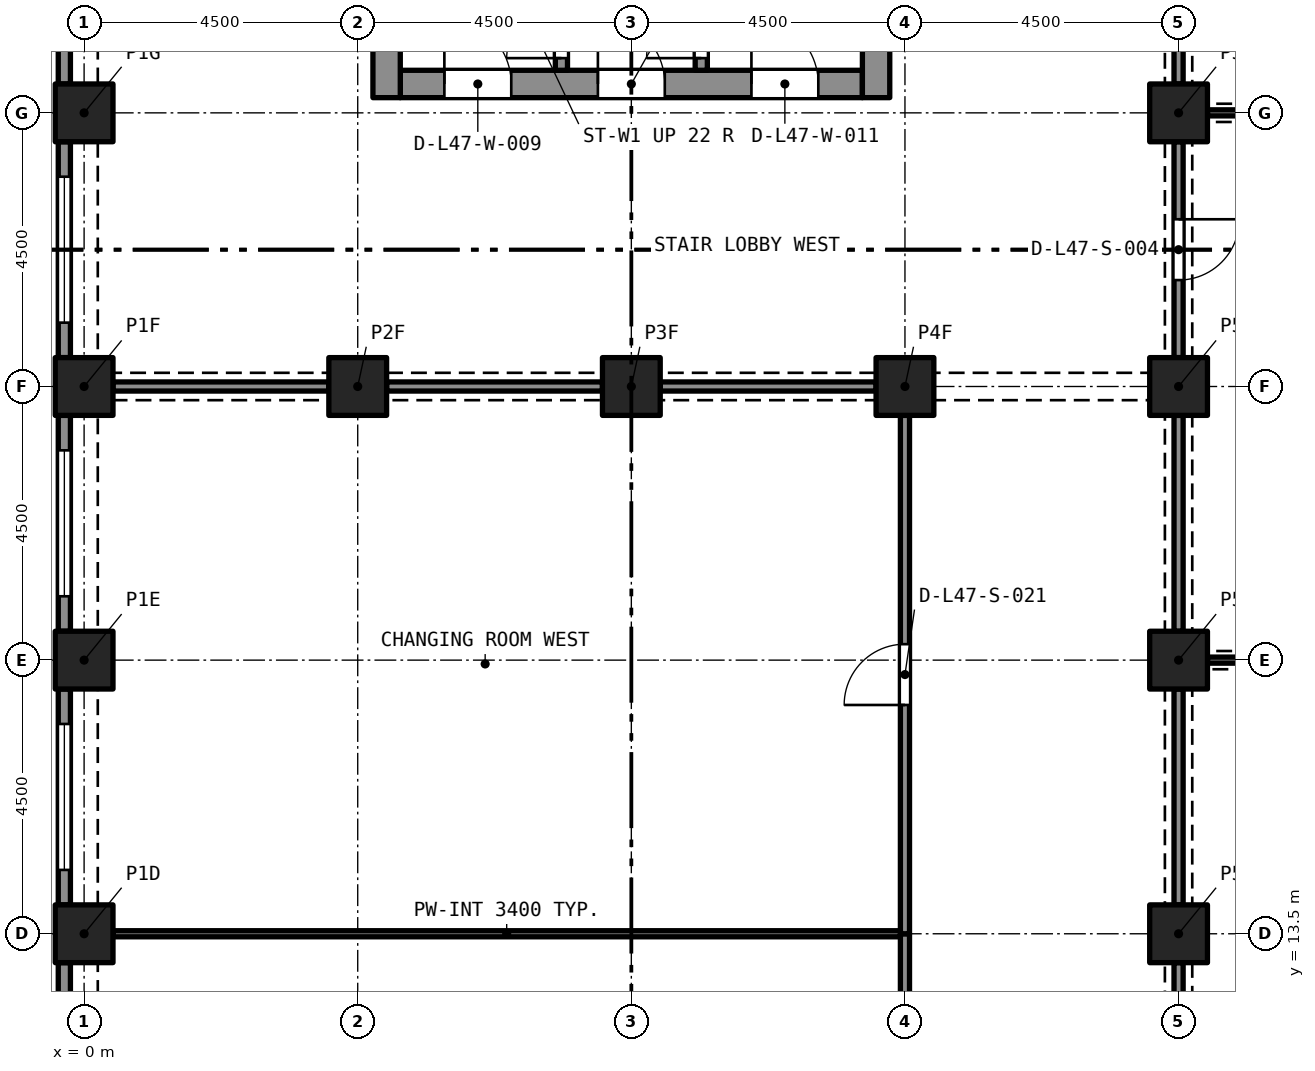
"""IFC4 building model, lengths in metres.
Left out: names, types, materials, properties, quantities, classifications, styles, units other than length and angle.
Written with IfcOpenShell. Run it as: python <this file> out.ifc"""

import sys

from ifc_helpers import new_model, si_unit, direction, frame, frame_2d, origin, origin_2d, place, context, subcontext, project, spatial, rectangle, extrude, element, fill, save


model = new_model("IFC4")
c1 = context("Model", 3, precision=1e-05, world=origin(), true_north=direction((0.0, 1.0)))
c2 = subcontext(c1, "Body", "Model", "MODEL_VIEW")
j1 = project(units=[si_unit("LENGTHUNIT", "METRE"), si_unit("PLANEANGLEUNIT", "RADIAN")], contexts=[c1])
p1 = place(None, origin())
s1 = spatial("IfcSite", under=j1, at=p1, CompositionType="ELEMENT")
p2 = place(p1, origin())
s2 = spatial("IfcBuilding", under=s1, at=p2, CompositionType="ELEMENT")
p3 = place(p2, frame((0.0, 0.0, 172.6)))
s3 = spatial("IfcBuildingStorey", under=s2, at=p3, CompositionType="ELEMENT", Elevation=172.6)
for number, where, z_axis, x_axis in (
    (1, (0.0, 13.5, 0.0), (0.0, 0.0, 1.0), (1.0, 0.0, 0.0)),
    (2, (18.0, 13.5, 0.0), (0.0, 0.0, 1.0), (1.0, 0.0, 0.0)),
    (3, (0.0, 18.0, 0.0), (0.0, 0.0, 1.0), (1.0, 0.0, 0.0)),
    (4, (18.0, 18.0, 0.0), (0.0, 0.0, 1.0), (1.0, 0.0, 0.0)),
    (5, (0.0, 22.5, 0.0), (0.0, 0.0, 1.0), (1.0, 0.0, 0.0)),
    (6, (4.5, 22.5, 0.0), (0.0, 0.0, 1.0), (1.0, 0.0, 0.0)),
    (7, (9.0, 22.5, 0.0), (0.0, 0.0, 1.0), (1.0, 0.0, 0.0)),
    (8, (13.5, 22.5, 0.0), (0.0, 0.0, 1.0), (1.0, 0.0, 0.0)),
    (9, (18.0, 22.5, 0.0), (0.0, 0.0, 1.0), (1.0, 0.0, 0.0)),
    (10, (0.0, 27.0, 0.0), (0.0, 0.0, 1.0), (1.0, 0.0, 0.0)),
    (11, (18.0, 27.0, 0.0), (0.0, 0.0, 1.0), (1.0, 0.0, 0.0)),
):
    element("IfcColumn", number, at=place(p3, frame(where, z_axis=z_axis, x_axis=x_axis)), inside=s3, PredefinedType="COLUMN", context=c2, shape_type="SweptSolid", body=[
        extrude(rectangle(XDim=0.95, YDim=0.95, at=origin_2d()), origin(), (0.0, 0.0, 1.0), 3.7),
    ])
p4 = place(p3, frame((5.2, 27.475, 0.0), z_axis=(0.0, 0.0, 1.0), x_axis=(1.0, 0.0, 0.0)))
e12 = element("IfcWall", 12, at=p4, inside=s3, PredefinedType="SOLIDWALL", context=c2, shape_type="SweptSolid", body=[
    extrude(rectangle(XDim=7.6, YDim=0.45, at=frame_2d((3.8, 0.0))), origin(), (0.0, 0.0, 1.0), 3.7),
])
p5 = place(p4, frame((0.725, 0.0, 0.0)))
e13 = element("IfcOpeningElement", 13, at=p5, cuts=e12, PredefinedType="OPENING", context=c2, shape_type="SweptSolid", body=[
    extrude(rectangle(XDim=1.1, YDim=2.1, at=frame_2d((0.55, 1.05))), frame((0.0, 0.235, 0.0), z_axis=(0.0, -1.0, 0.0), x_axis=(1.0, 0.0, 0.0)), (0.0, 0.0, 1.0), 0.47),
])
p6 = place(p4, frame((3.25, 0.0, 0.0)))
e14 = element("IfcOpeningElement", 14, at=p6, cuts=e12, PredefinedType="OPENING", context=c2, shape_type="SweptSolid", body=[
    extrude(rectangle(XDim=1.1, YDim=2.1, at=frame_2d((0.55, 1.05))), frame((0.0, 0.235, 0.0), z_axis=(0.0, -1.0, 0.0), x_axis=(1.0, 0.0, 0.0)), (0.0, 0.0, 1.0), 0.47),
])
p7 = place(p4, frame((5.775, 0.0, 0.0)))
e15 = element("IfcOpeningElement", 15, at=p7, cuts=e12, PredefinedType="OPENING", context=c2, shape_type="SweptSolid", body=[
    extrude(rectangle(XDim=1.1, YDim=2.1, at=frame_2d((0.55, 1.05))), frame((0.0, 0.235, 0.0), z_axis=(0.0, -1.0, 0.0), x_axis=(1.0, 0.0, 0.0)), (0.0, 0.0, 1.0), 0.47),
])
p8 = place(p3, frame((4.975, 27.25, 0.0), z_axis=(0.0, 0.0, 1.0), x_axis=(0.0, 1.0, 0.0)))
e16 = element("IfcWall", 16, at=p8, inside=s3, PredefinedType="SOLIDWALL", context=c2, shape_type="SweptSolid", body=[
    extrude(rectangle(XDim=13.0, YDim=0.45, at=frame_2d((6.5, 0.0))), origin(), (0.0, 0.0, 1.0), 3.7),
])
p9 = place(p8, frame((8.7, 0.0, 0.0)))
e17 = element("IfcOpeningElement", 17, at=p9, cuts=e16, PredefinedType="OPENING", context=c2, shape_type="SweptSolid", body=[
    extrude(rectangle(XDim=1.2, YDim=2.1, at=frame_2d((0.6, 1.05))), frame((0.0, 0.235, 0.0), z_axis=(0.0, -1.0, 0.0), x_axis=(1.0, 0.0, 0.0)), (0.0, 0.0, 1.0), 0.47),
])
p10 = place(p3, frame((13.025, 27.25, 0.0), z_axis=(0.0, 0.0, 1.0), x_axis=(0.0, 1.0, 0.0)))
e18 = element("IfcWall", 18, at=p10, inside=s3, PredefinedType="SOLIDWALL", context=c2, shape_type="SweptSolid", body=[
    extrude(rectangle(XDim=13.0, YDim=0.45, at=frame_2d((6.5, 0.0))), origin(), (0.0, 0.0, 1.0), 3.7),
])
p11 = place(p10, frame((10.85, 0.0, 0.0)))
e19 = element("IfcOpeningElement", 19, at=p11, cuts=e18, PredefinedType="OPENING", context=c2, shape_type="SweptSolid", body=[
    extrude(rectangle(XDim=1.1, YDim=2.1, at=frame_2d((0.55, 1.05))), frame((0.0, 0.235, 0.0), z_axis=(0.0, -1.0, 0.0), x_axis=(1.0, 0.0, 0.0)), (0.0, 0.0, 1.0), 0.47),
])
p12 = place(p10, frame((8.7, 0.0, 0.0)))
e20 = element("IfcOpeningElement", 20, at=p12, cuts=e18, PredefinedType="OPENING", context=c2, shape_type="SweptSolid", body=[
    extrude(rectangle(XDim=1.2, YDim=2.1, at=frame_2d((0.6, 1.05))), frame((0.0, 0.235, 0.0), z_axis=(0.0, -1.0, 0.0), x_axis=(1.0, 0.0, 0.0)), (0.0, 0.0, 1.0), 0.47),
])
p13 = place(p3, frame((-0.325, 27.475, 0.0), z_axis=(0.0, 0.0, 1.0), x_axis=(0.0, 1.0, 0.0)))
e21 = element("IfcWall", 21, at=p13, inside=s3, PredefinedType="SOLIDWALL", context=c2, shape_type="SweptSolid", body=[
    extrude(rectangle(XDim=3.55, YDim=0.2, at=frame_2d((1.775, 0.0))), origin(), (0.0, 0.0, 1.0), 3.7),
])
p14 = place(p13, frame((0.575, 0.0, 0.45)))
e22 = element("IfcOpeningElement", 22, at=p14, cuts=e21, PredefinedType="OPENING", context=c2, shape_type="SweptSolid", body=[
    extrude(rectangle(XDim=2.4, YDim=1.95, at=frame_2d((1.2, 0.975))), frame((0.0, 0.11, 0.0), z_axis=(0.0, -1.0, 0.0), x_axis=(1.0, 0.0, 0.0)), (0.0, 0.0, 1.0), 0.22),
])
p15 = place(p3, frame((-0.325, 22.975, 0.0), z_axis=(0.0, 0.0, 1.0), x_axis=(0.0, 1.0, 0.0)))
e23 = element("IfcWall", 23, at=p15, inside=s3, PredefinedType="SOLIDWALL", context=c2, shape_type="SweptSolid", body=[
    extrude(rectangle(XDim=3.55, YDim=0.2, at=frame_2d((1.775, 0.0))), origin(), (0.0, 0.0, 1.0), 3.7),
])
p16 = place(p15, frame((0.575, 0.0, 0.45)))
e24 = element("IfcOpeningElement", 24, at=p16, cuts=e23, PredefinedType="OPENING", context=c2, shape_type="SweptSolid", body=[
    extrude(rectangle(XDim=2.4, YDim=1.95, at=frame_2d((1.2, 0.975))), frame((0.0, 0.11, 0.0), z_axis=(0.0, -1.0, 0.0), x_axis=(1.0, 0.0, 0.0)), (0.0, 0.0, 1.0), 0.22),
])
p17 = place(p3, frame((-0.325, 18.475, 0.0), z_axis=(0.0, 0.0, 1.0), x_axis=(0.0, 1.0, 0.0)))
e25 = element("IfcWall", 25, at=p17, inside=s3, PredefinedType="SOLIDWALL", context=c2, shape_type="SweptSolid", body=[
    extrude(rectangle(XDim=3.55, YDim=0.2, at=frame_2d((1.775, 0.0))), origin(), (0.0, 0.0, 1.0), 3.7),
])
p18 = place(p17, frame((0.575, 0.0, 0.45)))
e26 = element("IfcOpeningElement", 26, at=p18, cuts=e25, PredefinedType="OPENING", context=c2, shape_type="SweptSolid", body=[
    extrude(rectangle(XDim=2.4, YDim=1.95, at=frame_2d((1.2, 0.975))), frame((0.0, 0.11, 0.0), z_axis=(0.0, -1.0, 0.0), x_axis=(1.0, 0.0, 0.0)), (0.0, 0.0, 1.0), 0.22),
])
p19 = place(p3, frame((-0.325, 13.975, 0.0), z_axis=(0.0, 0.0, 1.0), x_axis=(0.0, 1.0, 0.0)))
e27 = element("IfcWall", 27, at=p19, inside=s3, PredefinedType="SOLIDWALL", context=c2, shape_type="SweptSolid", body=[
    extrude(rectangle(XDim=3.55, YDim=0.2, at=frame_2d((1.775, 0.0))), origin(), (0.0, 0.0, 1.0), 3.7),
])
p20 = place(p19, frame((0.575, 0.0, 0.45)))
e28 = element("IfcOpeningElement", 28, at=p20, cuts=e27, PredefinedType="OPENING", context=c2, shape_type="SweptSolid", body=[
    extrude(rectangle(XDim=2.4, YDim=1.95, at=frame_2d((1.2, 0.975))), frame((0.0, 0.11, 0.0), z_axis=(0.0, -1.0, 0.0), x_axis=(1.0, 0.0, 0.0)), (0.0, 0.0, 1.0), 0.22),
])
p21 = place(p3, frame((-0.325, 9.475, 0.0), z_axis=(0.0, 0.0, 1.0), x_axis=(0.0, 1.0, 0.0)))
e29 = element("IfcWall", 29, at=p21, inside=s3, PredefinedType="SOLIDWALL", context=c2, shape_type="SweptSolid", body=[
    extrude(rectangle(XDim=3.55, YDim=0.2, at=frame_2d((1.775, 0.0))), origin(), (0.0, 0.0, 1.0), 3.7),
])
p22 = place(p21, frame((0.575, 0.0, 0.45)))
e30 = element("IfcOpeningElement", 30, at=p22, cuts=e29, PredefinedType="OPENING", context=c2, shape_type="SweptSolid", body=[
    extrude(rectangle(XDim=2.4, YDim=1.95, at=frame_2d((1.2, 0.975))), frame((0.0, 0.11, 0.0), z_axis=(0.0, -1.0, 0.0), x_axis=(1.0, 0.0, 0.0)), (0.0, 0.0, 1.0), 0.22),
])
p23 = place(p3, frame((7.85, 27.7, 0.0), z_axis=(0.0, 0.0, 1.0), x_axis=(0.0, 1.0, 0.0)))
e31 = element("IfcWall", 31, at=p23, inside=s3, PredefinedType="SOLIDWALL", context=c2, shape_type="SweptSolid", body=[
    extrude(rectangle(XDim=5.4, YDim=0.2, at=frame_2d((2.7, 0.0))), origin(), (0.0, 0.0, 1.0), 3.4),
])
p24 = place(p23, frame((0.2, 0.0, 0.0)))
e32 = element("IfcOpeningElement", 32, at=p24, cuts=e31, PredefinedType="OPENING", context=c2, shape_type="SweptSolid", body=[
    extrude(rectangle(XDim=0.9, YDim=2.1, at=frame_2d((0.45, 1.05))), frame((0.0, 0.11, 0.0), z_axis=(0.0, -1.0, 0.0), x_axis=(1.0, 0.0, 0.0)), (0.0, 0.0, 1.0), 0.22),
])
p25 = place(p3, frame((10.15, 27.7, 0.0), z_axis=(0.0, 0.0, 1.0), x_axis=(0.0, 1.0, 0.0)))
e33 = element("IfcWall", 33, at=p25, inside=s3, PredefinedType="SOLIDWALL", context=c2, shape_type="SweptSolid", body=[
    extrude(rectangle(XDim=5.4, YDim=0.2, at=frame_2d((2.7, 0.0))), origin(), (0.0, 0.0, 1.0), 3.4),
])
p26 = place(p25, frame((0.2, 0.0, 0.0)))
e34 = element("IfcOpeningElement", 34, at=p26, cuts=e33, PredefinedType="OPENING", context=c2, shape_type="SweptSolid", body=[
    extrude(rectangle(XDim=0.9, YDim=2.1, at=frame_2d((0.45, 1.05))), frame((0.0, 0.11, 0.0), z_axis=(0.0, -1.0, 0.0), x_axis=(1.0, 0.0, 0.0)), (0.0, 0.0, 1.0), 0.22),
])
p27 = place(p3, frame((18.475, 18.0, 0.0), z_axis=(0.0, 0.0, 1.0), x_axis=(1.0, 0.0, 0.0)))
e35 = element("IfcWall", 35, at=p27, inside=s3, PredefinedType="PARTITIONING", context=c2, shape_type="SweptSolid", body=[
    extrude(rectangle(XDim=12.55, YDim=0.1, at=frame_2d((6.275, 0.0))), origin(), (0.0, 0.0, 1.0), 3.25),
])
p28 = place(p3, frame((18.0, 13.025, 0.0), z_axis=(0.0, 0.0, 1.0), x_axis=(0.0, -1.0, 0.0)))
e36 = element("IfcWall", 36, at=p28, inside=s3, PredefinedType="PARTITIONING", context=c2, shape_type="SweptSolid", body=[
    extrude(rectangle(XDim=3.55, YDim=0.15, at=frame_2d((1.775, 0.0))), origin(), (0.0, 0.0, 1.0), 2.88),
])
p29 = place(p28, frame((1.275, 0.0, 0.0)))
e37 = element("IfcOpeningElement", 37, at=p29, cuts=e36, PredefinedType="OPENING", context=c2, shape_type="SweptSolid", body=[
    extrude(rectangle(XDim=1.0, YDim=2.1, at=frame_2d((0.5, 1.05))), frame((0.0, 0.085, 0.0), z_axis=(0.0, -1.0, 0.0), x_axis=(1.0, 0.0, 0.0)), (0.0, 0.0, 1.0), 0.17),
])
p30 = place(p3, frame((18.0, 13.975, 0.0), z_axis=(0.0, 0.0, 1.0), x_axis=(0.0, 1.0, 0.0)))
e38 = element("IfcWall", 38, at=p30, inside=s3, PredefinedType="PARTITIONING", context=c2, shape_type="SweptSolid", body=[
    extrude(rectangle(XDim=3.55, YDim=0.15, at=frame_2d((1.775, 0.0))), origin(), (0.0, 0.0, 1.0), 2.88),
])
p31 = place(p3, frame((18.475, 27.0, 0.0), z_axis=(0.0, 0.0, 1.0), x_axis=(1.0, 0.0, 0.0)))
e39 = element("IfcWall", 39, at=p31, inside=s3, PredefinedType="PARTITIONING", context=c2, shape_type="SweptSolid", body=[
    extrude(rectangle(XDim=12.55, YDim=0.1, at=frame_2d((6.275, 0.0))), origin(), (0.0, 0.0, 1.0), 3.25),
])
p32 = place(p3, frame((18.0, 26.525, 0.0), z_axis=(0.0, 0.0, 1.0), x_axis=(0.0, -1.0, 0.0)))
e40 = element("IfcWall", 40, at=p32, inside=s3, PredefinedType="PARTITIONING", context=c2, shape_type="SweptSolid", body=[
    extrude(rectangle(XDim=3.55, YDim=0.15, at=frame_2d((1.775, 0.0))), origin(), (0.0, 0.0, 1.0), 2.88),
])
p33 = place(p32, frame((1.275, 0.0, 0.0)))
e41 = element("IfcOpeningElement", 41, at=p33, cuts=e40, PredefinedType="OPENING", context=c2, shape_type="SweptSolid", body=[
    extrude(rectangle(XDim=1.0, YDim=2.1, at=frame_2d((0.5, 1.05))), frame((0.0, 0.085, 0.0), z_axis=(0.0, -1.0, 0.0), x_axis=(1.0, 0.0, 0.0)), (0.0, 0.0, 1.0), 0.17),
])
p34 = place(p3, frame((18.0, 18.475, 0.0), z_axis=(0.0, 0.0, 1.0), x_axis=(0.0, 1.0, 0.0)))
e42 = element("IfcWall", 42, at=p34, inside=s3, PredefinedType="PARTITIONING", context=c2, shape_type="SweptSolid", body=[
    extrude(rectangle(XDim=3.55, YDim=0.15, at=frame_2d((1.775, 0.0))), origin(), (0.0, 0.0, 1.0), 2.88),
])
p35 = place(p3, frame((18.0, 31.025, 0.0), z_axis=(0.0, 0.0, 1.0), x_axis=(0.0, -1.0, 0.0)))
e43 = element("IfcWall", 43, at=p35, inside=s3, PredefinedType="PARTITIONING", context=c2, shape_type="SweptSolid", body=[
    extrude(rectangle(XDim=3.55, YDim=0.15, at=frame_2d((1.775, 0.0))), origin(), (0.0, 0.0, 1.0), 2.88),
])
p36 = place(p35, frame((1.175, 0.0, 0.0)))
e44 = element("IfcOpeningElement", 44, at=p36, cuts=e43, PredefinedType="OPENING", context=c2, shape_type="SweptSolid", body=[
    extrude(rectangle(XDim=1.2, YDim=2.1, at=frame_2d((0.6, 1.05))), frame((0.0, 0.085, 0.0), z_axis=(0.0, -1.0, 0.0), x_axis=(1.0, 0.0, 0.0)), (0.0, 0.0, 1.0), 0.17),
])
for number, where, z_axis, x_axis in (
    (45, (9.475, 22.5, 0.0), (0.0, 0.0, 1.0), (1.0, 0.0, 0.0)),
    (46, (4.975, 22.5, 0.0), (0.0, 0.0, 1.0), (1.0, 0.0, 0.0)),
    (47, (0.475, 22.5, 0.0), (0.0, 0.0, 1.0), (1.0, 0.0, 0.0)),
):
    element("IfcWall", number, at=place(p3, frame(where, z_axis=z_axis, x_axis=x_axis)), inside=s3, PredefinedType="PARTITIONING", context=c2, shape_type="SweptSolid", body=[
        extrude(rectangle(XDim=3.55, YDim=0.15, at=frame_2d((1.775, 0.0))), origin(), (0.0, 0.0, 1.0), 2.88),
    ])
p37 = place(p3, frame((13.5, 4.5, 0.0), z_axis=(0.0, 0.0, 1.0), x_axis=(0.0, 1.0, 0.0)))
e48 = element("IfcWall", 48, at=p37, inside=s3, PredefinedType="PARTITIONING", context=c2, shape_type="SweptSolid", body=[
    extrude(rectangle(XDim=9.0, YDim=0.15, at=frame_2d((4.5, 0.0))), origin(), (0.0, 0.0, 1.0), 3.4),
])
p38 = place(p37, frame((4.0, 0.0, 0.0)))
e49 = element("IfcOpeningElement", 49, at=p38, cuts=e48, PredefinedType="OPENING", context=c2, shape_type="SweptSolid", body=[
    extrude(rectangle(XDim=1.0, YDim=2.1, at=frame_2d((0.5, 1.05))), frame((0.0, 0.085, 0.0), z_axis=(0.0, -1.0, 0.0), x_axis=(1.0, 0.0, 0.0)), (0.0, 0.0, 1.0), 0.17),
])
p39 = place(p3, frame((13.5, 13.5, 0.0), z_axis=(0.0, 0.0, 1.0), x_axis=(0.0, 1.0, 0.0)))
e50 = element("IfcWall", 50, at=p39, inside=s3, PredefinedType="PARTITIONING", context=c2, shape_type="SweptSolid", body=[
    extrude(rectangle(XDim=8.525, YDim=0.15, at=frame_2d((4.262, 0.0))), origin(), (0.0, 0.0, 1.0), 3.4),
])
p40 = place(p39, frame((3.762, 0.0, 0.0)))
e51 = element("IfcOpeningElement", 51, at=p40, cuts=e50, PredefinedType="OPENING", context=c2, shape_type="SweptSolid", body=[
    extrude(rectangle(XDim=1.0, YDim=2.1, at=frame_2d((0.5, 1.05))), frame((0.0, 0.085, 0.0), z_axis=(0.0, -1.0, 0.0), x_axis=(1.0, 0.0, 0.0)), (0.0, 0.0, 1.0), 0.17),
])
p41 = place(p3, frame((0.475, 13.5, 0.0), z_axis=(0.0, 0.0, 1.0), x_axis=(1.0, 0.0, 0.0)))
e52 = element("IfcWall", 52, at=p41, inside=s3, PredefinedType="PARTITIONING", context=c2, shape_type="SweptSolid", body=[
    extrude(rectangle(XDim=12.95, YDim=0.1, at=frame_2d((6.475, 0.0))), origin(), (0.0, 0.0, 1.0), 3.4),
])
p42 = place(p16, origin())
e53 = element("IfcWindow", 53, at=p42, inside=s3, PartitioningType="SINGLE_PANEL", PredefinedType="WINDOW", context=c2, shape_type="SweptSolid", body=[
    extrude(rectangle(XDim=2.4, YDim=1.95, at=frame_2d((1.2, 0.975))), frame((0.0, 0.03, 0.0), z_axis=(0.0, -1.0, 0.0), x_axis=(1.0, 0.0, 0.0)), (0.0, 0.0, 1.0), 0.06),
])
fill(e24, e53)
p43 = place(p18, origin())
e54 = element("IfcWindow", 54, at=p43, inside=s3, PartitioningType="SINGLE_PANEL", PredefinedType="WINDOW", context=c2, shape_type="SweptSolid", body=[
    extrude(rectangle(XDim=2.4, YDim=1.95, at=frame_2d((1.2, 0.975))), frame((0.0, 0.03, 0.0), z_axis=(0.0, -1.0, 0.0), x_axis=(1.0, 0.0, 0.0)), (0.0, 0.0, 1.0), 0.06),
])
fill(e26, e54)
p44 = place(p20, origin())
e55 = element("IfcWindow", 55, at=p44, inside=s3, PartitioningType="SINGLE_PANEL", PredefinedType="WINDOW", context=c2, shape_type="SweptSolid", body=[
    extrude(rectangle(XDim=2.4, YDim=1.95, at=frame_2d((1.2, 0.975))), frame((0.0, 0.03, 0.0), z_axis=(0.0, -1.0, 0.0), x_axis=(1.0, 0.0, 0.0)), (0.0, 0.0, 1.0), 0.06),
])
fill(e28, e55)
p45 = place(p24, origin())
e56 = element("IfcDoor", 56, at=p45, inside=s3, OperationType="SINGLE_SWING_LEFT", PredefinedType="DOOR", context=c2, shape_type="SweptSolid", body=[
    extrude(rectangle(XDim=0.9, YDim=2.1, at=frame_2d((0.45, 1.05))), frame((0.0, 0.025, 0.0), z_axis=(0.0, -1.0, 0.0), x_axis=(1.0, 0.0, 0.0)), (0.0, 0.0, 1.0), 0.05),
])
fill(e32, e56)
p46 = place(p26, origin())
e57 = element("IfcDoor", 57, at=p46, inside=s3, OperationType="SINGLE_SWING_LEFT", PredefinedType="DOOR", context=c2, shape_type="SweptSolid", body=[
    extrude(rectangle(XDim=0.9, YDim=2.1, at=frame_2d((0.45, 1.05))), frame((0.0, 0.025, 0.0), z_axis=(0.0, -1.0, 0.0), x_axis=(1.0, 0.0, 0.0)), (0.0, 0.0, 1.0), 0.05),
])
fill(e34, e57)
p47 = place(p5, origin())
e58 = element("IfcDoor", 58, at=p47, inside=s3, OperationType="SINGLE_SWING_LEFT", PredefinedType="DOOR", context=c2, shape_type="SweptSolid", body=[
    extrude(rectangle(XDim=1.1, YDim=2.1, at=frame_2d((0.55, 1.05))), frame((0.0, 0.025, 0.0), z_axis=(0.0, -1.0, 0.0), x_axis=(1.0, 0.0, 0.0)), (0.0, 0.0, 1.0), 0.05),
])
fill(e13, e58)
p48 = place(p6, origin())
e59 = element("IfcDoor", 59, at=p48, inside=s3, OperationType="SINGLE_SWING_LEFT", PredefinedType="DOOR", context=c2, shape_type="SweptSolid", body=[
    extrude(rectangle(XDim=1.1, YDim=2.1, at=frame_2d((0.55, 1.05))), frame((0.0, 0.025, 0.0), z_axis=(0.0, -1.0, 0.0), x_axis=(1.0, 0.0, 0.0)), (0.0, 0.0, 1.0), 0.05),
])
fill(e14, e59)
p49 = place(p7, origin())
e60 = element("IfcDoor", 60, at=p49, inside=s3, OperationType="SINGLE_SWING_LEFT", PredefinedType="DOOR", context=c2, shape_type="SweptSolid", body=[
    extrude(rectangle(XDim=1.1, YDim=2.1, at=frame_2d((0.55, 1.05))), frame((0.0, 0.025, 0.0), z_axis=(0.0, -1.0, 0.0), x_axis=(1.0, 0.0, 0.0)), (0.0, 0.0, 1.0), 0.05),
])
fill(e15, e60)
p50 = place(p33, origin())
e61 = element("IfcDoor", 61, at=p50, inside=s3, OperationType="SINGLE_SWING_RIGHT", PredefinedType="DOOR", context=c2, shape_type="SweptSolid", body=[
    extrude(rectangle(XDim=1.0, YDim=2.1, at=frame_2d((0.5, 1.05))), frame((0.0, 0.025, 0.0), z_axis=(0.0, -1.0, 0.0), x_axis=(1.0, 0.0, 0.0)), (0.0, 0.0, 1.0), 0.05),
])
fill(e41, e61)
p51 = place(p40, origin())
e62 = element("IfcDoor", 62, at=p51, inside=s3, OperationType="SINGLE_SWING_RIGHT", PredefinedType="DOOR", context=c2, shape_type="SweptSolid", body=[
    extrude(rectangle(XDim=1.0, YDim=2.1, at=frame_2d((0.5, 1.05))), frame((0.0, 0.025, 0.0), z_axis=(0.0, -1.0, 0.0), x_axis=(1.0, 0.0, 0.0)), (0.0, 0.0, 1.0), 0.05),
])
fill(e51, e62)
save(model, sys.argv[1])
